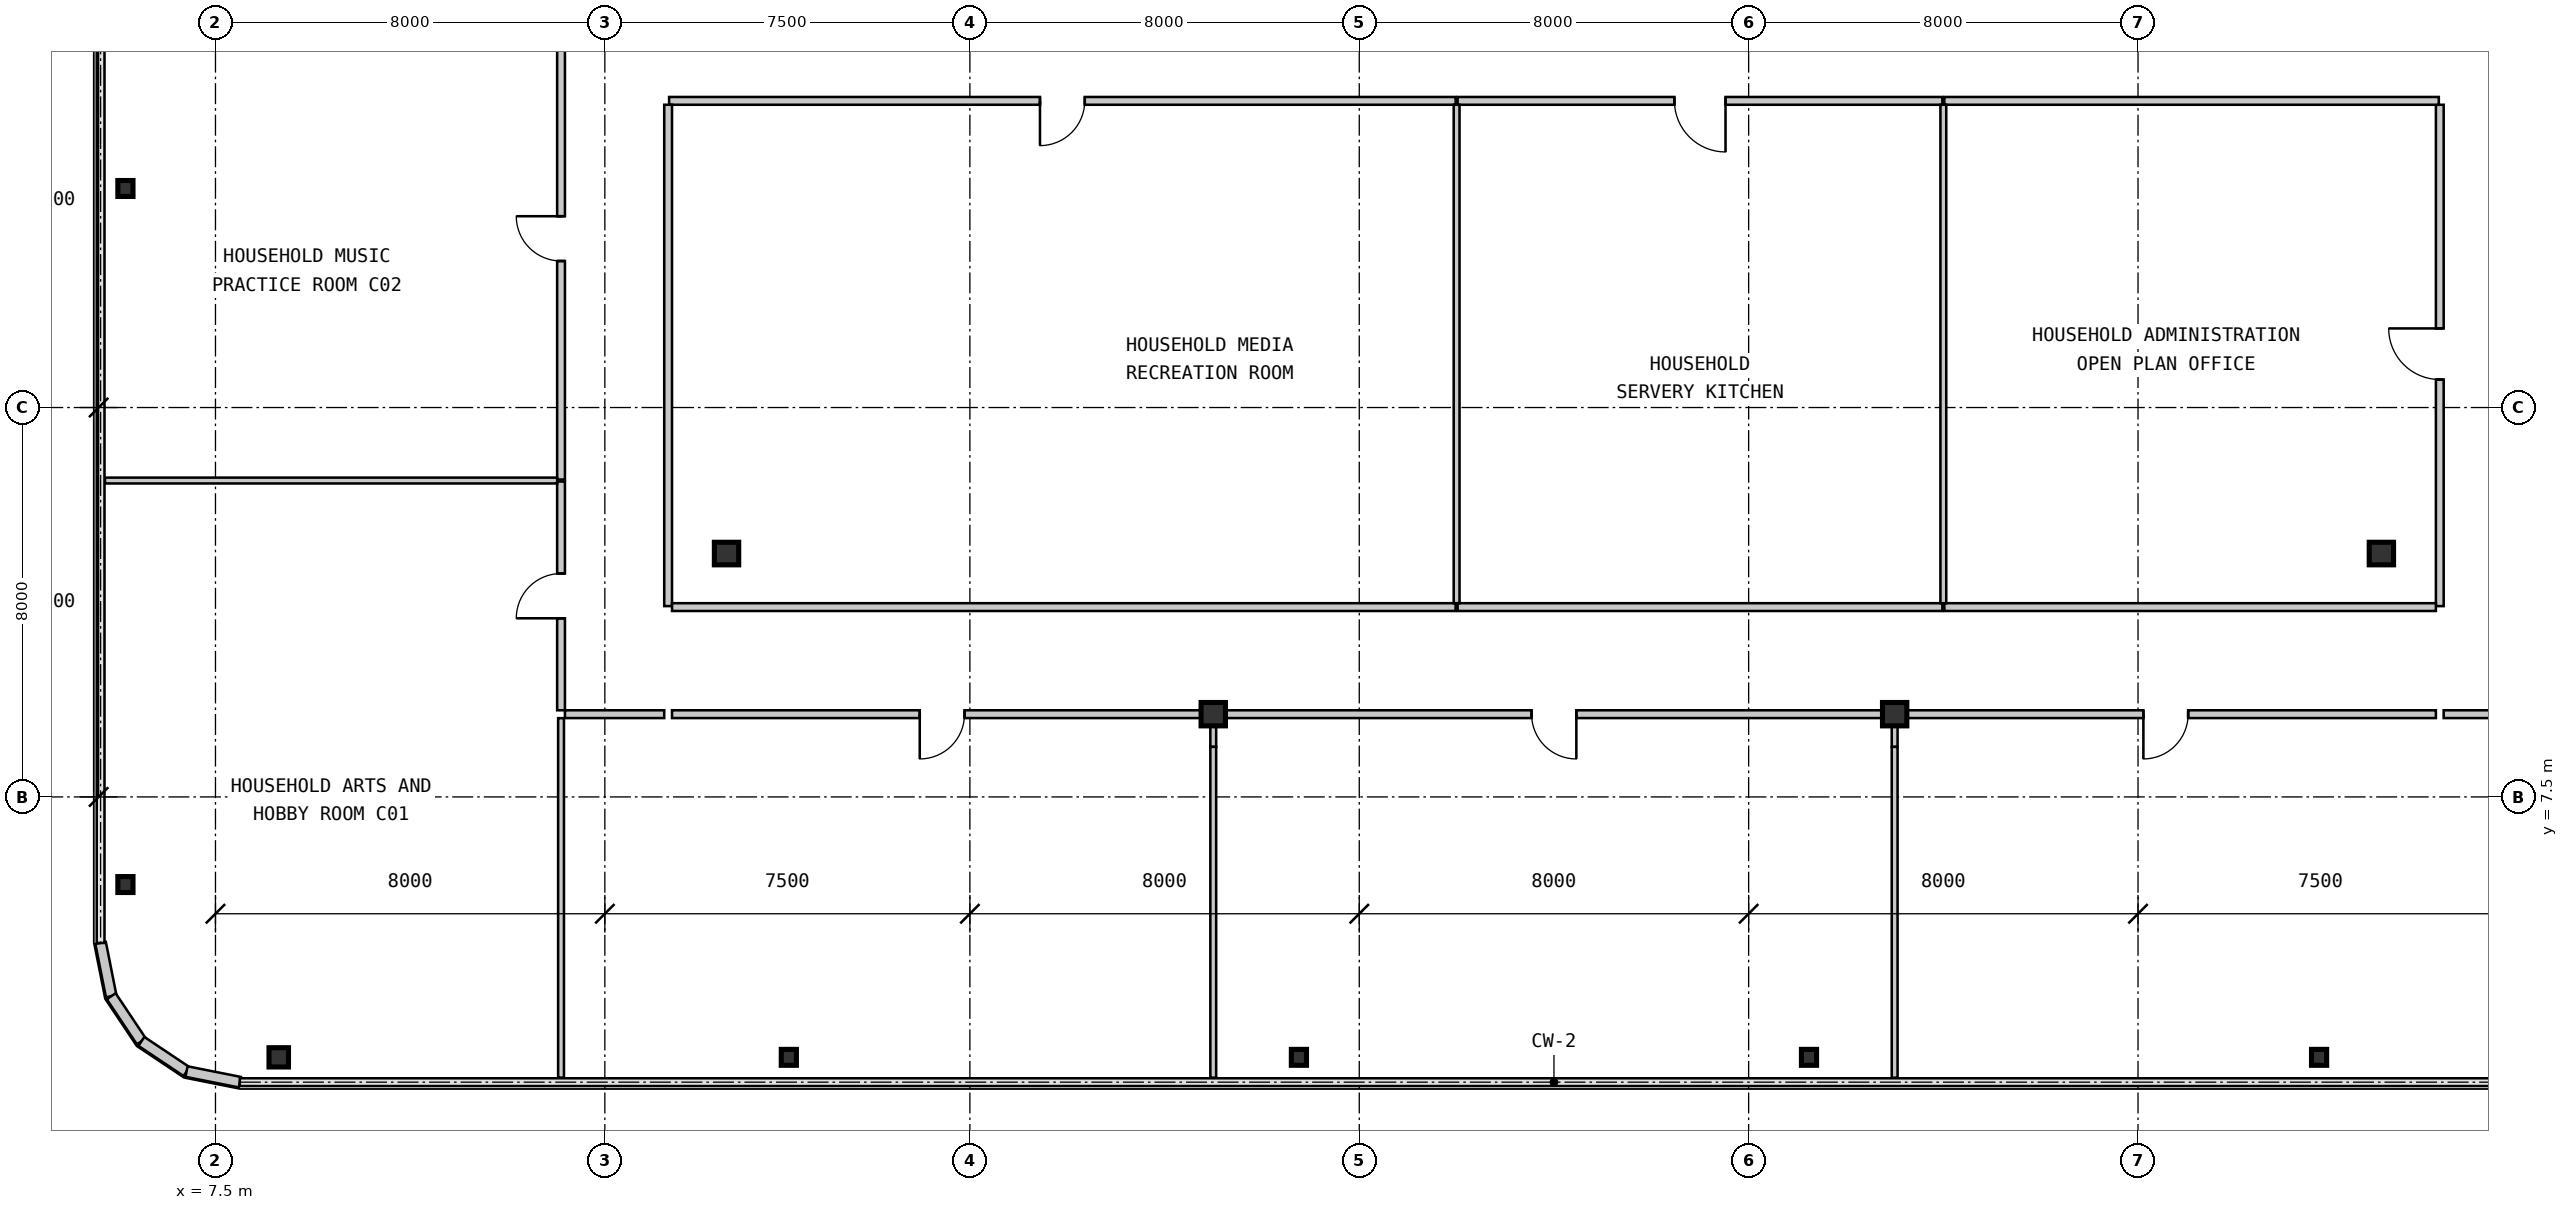
"""IFC4 building model, lengths in metres.
Left out: names, types, materials, properties, quantities, classifications, styles, units other than length and angle.
Written with IfcOpenShell. Run it as: python <this file> out.ifc"""

import sys

from ifc_helpers import new_model, si_unit, direction, frame, frame_2d, origin, origin_2d, place, context, subcontext, project, spatial, rectangle, i_section, extrude, source, transform, mapped, element, fill, save


model = new_model("IFC4")
c1 = context("Model", 3, precision=1e-05, world=origin(), true_north=direction((0.0, 1.0)))
c2 = subcontext(c1, "Body", "Model", "MODEL_VIEW")
j1 = project(units=[si_unit("LENGTHUNIT", "METRE"), si_unit("PLANEANGLEUNIT", "RADIAN")], contexts=[c1])
p1 = place(None, origin())
s1 = spatial("IfcSite", under=j1, at=p1, CompositionType="ELEMENT")
p2 = place(p1, origin())
s2 = spatial("IfcBuilding", under=s1, at=p2, CompositionType="ELEMENT")
p3 = place(p2, frame((0.0, 0.0, 38.85)))
s3 = spatial("IfcBuildingStorey", under=s2, at=p3, CompositionType="ELEMENT", Elevation=38.85)
m1 = source(origin(), c2, "Body", "SweptSolid", [
    extrude(i_section(OverallWidth=0.5, OverallDepth=0.48, WebThickness=0.028, FlangeThickness=0.044, at=origin_2d()), origin(), (0.0, 0.0, 1.0), 3.15),
])
for number, where, z_axis, x_axis in (
    (1, (28.0, 9.2, 0.0), (0.0, 0.0, 1.0), (1.0, 0.0, 0.0)),
    (2, (42.0, 9.2, 0.0), (0.0, 0.0, 1.0), (1.0, 0.0, 0.0)),
):
    element("IfcColumn", number, at=place(p3, frame(where, z_axis=z_axis, x_axis=x_axis)), inside=s3, PredefinedType="COLUMN", context=c2, shape_type="MappedRepresentation", body=[
        mapped(m1, transform((0.0, 0.0, 0.0), scale=1.0)),
    ])
m2 = source(origin(), c2, "Body", "SweptSolid", [
    extrude(i_section(OverallWidth=0.5, OverallDepth=0.464, WebThickness=0.022, FlangeThickness=0.034, at=origin_2d()), origin(), (0.0, 0.0, 1.0), 3.15),
])
for number, where, z_axis, x_axis in (
    (3, (18.0, 12.5, 0.0), (0.0, 0.0, 1.0), (1.0, 0.0, 0.0)),
    (4, (52.0, 12.5, 0.0), (0.0, 0.0, 1.0), (1.0, 0.0, 0.0)),
):
    element("IfcColumn", number, at=place(p3, frame(where, z_axis=z_axis, x_axis=x_axis)), inside=s3, PredefinedType="COLUMN", context=c2, shape_type="MappedRepresentation", body=[
        mapped(m2, transform((0.0, 0.0, 0.0), scale=1.0)),
    ])
m3 = source(origin(), c2, "Body", "SweptSolid", [
    extrude(i_section(OverallWidth=0.4, OverallDepth=0.396, WebThickness=0.022, FlangeThickness=0.034, at=origin_2d()), origin(), (0.0, 0.0, 1.0), 3.15),
])
p4 = place(p3, frame((8.8, 2.15, 0.0), z_axis=(0.0, 0.0, 1.0), x_axis=(1.0, 0.0, 0.0)))
e5 = element("IfcColumn", 5, at=p4, inside=s3, PredefinedType="COLUMN", context=c2, shape_type="MappedRepresentation", body=[
    mapped(m3, transform((0.0, 0.0, 0.0), scale=1.0)),
])
m4 = source(origin(), c2, "Body", "SweptSolid", [
    extrude(i_section(OverallWidth=0.311, OverallDepth=0.327, WebThickness=0.016, FlangeThickness=0.025, at=origin_2d()), origin(), (0.0, 0.0, 1.0), 3.15),
])
for number, where, z_axis, x_axis in (
    (6, (19.28, 2.15, 0.0), (0.0, 0.0, 1.0), (1.0, 0.0, 0.0)),
    (7, (29.76, 2.15, 0.0), (0.0, 0.0, 1.0), (1.0, 0.0, 0.0)),
    (8, (40.24, 2.15, 0.0), (0.0, 0.0, 1.0), (1.0, 0.0, 0.0)),
    (9, (50.72, 2.15, 0.0), (0.0, 0.0, 1.0), (1.0, 0.0, 0.0)),
    (10, (5.65, 5.7, 0.0), (0.0, 0.0, 1.0), (1.0, 0.0, 0.0)),
    (11, (5.65, 20.0, 0.0), (0.0, 0.0, 1.0), (1.0, 0.0, 0.0)),
):
    element("IfcColumn", number, at=place(p3, frame(where, z_axis=z_axis, x_axis=x_axis)), inside=s3, PredefinedType="COLUMN", context=c2, shape_type="MappedRepresentation", body=[
        mapped(m4, transform((0.0, 0.0, 0.0), scale=1.0)),
    ])
m5 = source(origin(), c2, "Body", "SweptSolid", [
    extrude(rectangle(XDim=1.116, YDim=0.22, at=frame_2d((0.558, 0.0))), origin(), (0.0, 0.0, 1.0), 2.93),
])
for number, where, z_axis, x_axis in (
    (12, (5.14, 4.5, 0.0), (0.0, 0.0, 1.0), (0.195, -0.981, 0.0)),
    (13, (5.358, 3.406, 0.0), (0.0, 0.0, 1.0), (0.556, -0.831, 0.0)),
    (14, (5.978, 2.478, 0.0), (0.0, 0.0, 1.0), (0.831, -0.556, 0.0)),
    (15, (6.906, 1.858, 0.0), (0.0, 0.0, 1.0), (0.981, -0.195, 0.0)),
):
    element("IfcWall", number, at=place(p3, frame(where, z_axis=z_axis, x_axis=x_axis)), inside=s3, PredefinedType="SOLIDWALL", context=c2, shape_type="MappedRepresentation", body=[
        mapped(m5, transform((0.0, 0.0, 0.0), scale=1.0)),
    ])
m6 = source(origin(), c2, "Body", "SweptSolid", [
    extrude(rectangle(XDim=16.159, YDim=0.16, at=frame_2d((8.08, 0.0))), origin(), (0.0, 0.0, 1.0), 2.93),
])
p5 = place(p3, frame((32.98, 21.8, 0.0), z_axis=(0.0, 0.0, 1.0), x_axis=(-1.0, 0.0, 0.0)))
e16 = element("IfcWall", 16, at=p5, inside=s3, PredefinedType="PARTITIONING", context=c2, shape_type="MappedRepresentation", body=[
    mapped(m6, transform((0.0, 0.0, 0.0), scale=1.0)),
])
m7 = source(origin(), c2, "Body", "SweptSolid", [
    extrude(rectangle(XDim=0.92, YDim=2.1, at=frame_2d((0.46, 1.05))), frame((0.0, 0.09, 0.0), z_axis=(0.0, -1.0, 0.0), x_axis=(1.0, 0.0, 0.0)), (0.0, 0.0, 1.0), 0.18),
])
p6 = place(p5, frame((7.62, 0.0, 0.0)))
e17 = element("IfcOpeningElement", 17, at=p6, cuts=e16, PredefinedType="OPENING", context=c2, shape_type="MappedRepresentation", body=[
    mapped(m7, transform((0.0, 0.0, 0.0), scale=1.0)),
])
m8 = source(origin(), c2, "Body", "SweptSolid", [
    extrude(rectangle(XDim=10.3, YDim=0.16, at=frame_2d((5.15, 0.0))), origin(), (0.0, 0.0, 1.0), 2.93),
])
p7 = place(p3, frame((16.8, 21.72, 0.0), z_axis=(0.0, 0.0, 1.0), x_axis=(0.0, -1.0, 0.0)))
e18 = element("IfcWall", 18, at=p7, inside=s3, PredefinedType="PARTITIONING", context=c2, shape_type="MappedRepresentation", body=[
    mapped(m8, transform((0.0, 0.0, 0.0), scale=1.0)),
])
m9 = source(origin(), c2, "Body", "SweptSolid", [
    extrude(rectangle(XDim=9.959, YDim=0.16, at=frame_2d((4.98, 0.0))), origin(), (0.0, 0.0, 1.0), 2.93),
])
p8 = place(p3, frame((42.98, 21.8, 0.0), z_axis=(0.0, 0.0, 1.0), x_axis=(-1.0, 0.0, 0.0)))
e19 = element("IfcWall", 19, at=p8, inside=s3, PredefinedType="PARTITIONING", context=c2, shape_type="MappedRepresentation", body=[
    mapped(m9, transform((0.0, 0.0, 0.0), scale=1.0)),
])
m10 = source(origin(), c2, "Body", "SweptSolid", [
    extrude(rectangle(XDim=1.05, YDim=2.1, at=frame_2d((0.525, 1.05))), frame((0.0, 0.09, 0.0), z_axis=(0.0, -1.0, 0.0), x_axis=(1.0, 0.0, 0.0)), (0.0, 0.0, 1.0), 0.18),
])
p9 = place(p8, frame((4.455, 0.0, 0.0)))
e20 = element("IfcOpeningElement", 20, at=p9, cuts=e19, PredefinedType="OPENING", context=c2, shape_type="MappedRepresentation", body=[
    mapped(m10, transform((0.0, 0.0, 0.0), scale=1.0)),
])
p10 = place(p3, frame((53.2, 11.42, 0.0), z_axis=(0.0, 0.0, 1.0), x_axis=(0.0, 1.0, 0.0)))
e21 = element("IfcWall", 21, at=p10, inside=s3, PredefinedType="PARTITIONING", context=c2, shape_type="MappedRepresentation", body=[
    mapped(m8, transform((0.0, 0.0, 0.0), scale=1.0)),
])
p11 = place(p10, frame((4.655, 0.0, 0.0)))
e22 = element("IfcOpeningElement", 22, at=p11, cuts=e21, PredefinedType="OPENING", context=c2, shape_type="MappedRepresentation", body=[
    mapped(m10, transform((0.0, 0.0, 0.0), scale=1.0)),
])
m11 = source(origin(), c2, "Body", "SweptSolid", [
    extrude(rectangle(XDim=10.159, YDim=0.16, at=frame_2d((5.08, 0.0))), origin(), (0.0, 0.0, 1.0), 2.93),
])
p12 = place(p3, frame((53.18, 21.8, 0.0), z_axis=(0.0, 0.0, 1.0), x_axis=(-1.0, 0.0, 0.0)))
e23 = element("IfcWall", 23, at=p12, inside=s3, PredefinedType="PARTITIONING", context=c2, shape_type="MappedRepresentation", body=[
    mapped(m11, transform((0.0, 0.0, 0.0), scale=1.0)),
])
m12 = source(origin(), c2, "Body", "SweptSolid", [
    extrude(rectangle(XDim=2.04, YDim=0.16, at=frame_2d((1.02, 0.0))), origin(), (0.0, 0.0, 1.0), 2.93),
])
for number, where, z_axis, x_axis in (
    (24, (16.72, 9.2, 0.0), (0.0, 0.0, 1.0), (-1.0, 0.0, 0.0)),
    (25, (55.32, 9.2, 0.0), (0.0, 0.0, 1.0), (-1.0, 0.0, 0.0)),
):
    element("IfcWall", number, at=place(p3, frame(where, z_axis=z_axis, x_axis=x_axis)), inside=s3, PredefinedType="PARTITIONING", context=c2, shape_type="MappedRepresentation", body=[
        mapped(m12, transform((0.0, 0.0, 0.0), scale=1.0)),
    ])
m13 = source(origin(), c2, "Body", "SweptSolid", [
    extrude(rectangle(XDim=4.7, YDim=0.16, at=frame_2d((2.35, 0.0))), origin(), (0.0, 0.0, 1.0), 2.93),
])
p13 = place(p3, frame((14.6, 9.28, 0.0), z_axis=(0.0, 0.0, 1.0), x_axis=(0.0, 1.0, 0.0)))
e26 = element("IfcWall", 26, at=p13, inside=s3, PredefinedType="PARTITIONING", context=c2, shape_type="MappedRepresentation", body=[
    mapped(m13, transform((0.0, 0.0, 0.0), scale=1.0)),
])
p14 = place(p13, frame((1.89, 0.0, 0.0)))
e27 = element("IfcOpeningElement", 27, at=p14, cuts=e26, PredefinedType="OPENING", context=c2, shape_type="MappedRepresentation", body=[
    mapped(m7, transform((0.0, 0.0, 0.0), scale=1.0)),
])
m14 = source(origin(), c2, "Body", "SweptSolid", [
    extrude(rectangle(XDim=9.9, YDim=0.16, at=frame_2d((4.95, 0.0))), origin(), (0.0, 0.0, 1.0), 2.93),
])
p15 = place(p3, frame((14.6, 14.02, 0.0), z_axis=(0.0, 0.0, 1.0), x_axis=(0.0, 1.0, 0.0)))
e28 = element("IfcWall", 28, at=p15, inside=s3, PredefinedType="PARTITIONING", context=c2, shape_type="MappedRepresentation", body=[
    mapped(m14, transform((0.0, 0.0, 0.0), scale=1.0)),
])
p16 = place(p15, frame((4.49, 0.0, 0.0)))
e29 = element("IfcOpeningElement", 29, at=p16, cuts=e28, PredefinedType="OPENING", context=c2, shape_type="MappedRepresentation", body=[
    mapped(m7, transform((0.0, 0.0, 0.0), scale=1.0)),
])
m15 = source(origin(), c2, "Body", "SweptSolid", [
    extrude(rectangle(XDim=16.1, YDim=0.16, at=frame_2d((8.05, 0.0))), origin(), (0.0, 0.0, 1.0), 2.93),
])
p17 = place(p3, frame((16.88, 11.4, 0.0), z_axis=(0.0, 0.0, 1.0), x_axis=(1.0, 0.0, 0.0)))
e30 = element("IfcWall", 30, at=p17, inside=s3, PredefinedType="PARTITIONING", context=c2, shape_type="MappedRepresentation", body=[
    mapped(m15, transform((0.0, 0.0, 0.0), scale=1.0)),
])
p18 = place(p3, frame((33.02, 11.4, 0.0), z_axis=(0.0, 0.0, 1.0), x_axis=(1.0, 0.0, 0.0)))
e31 = element("IfcWall", 31, at=p18, inside=s3, PredefinedType="PARTITIONING", context=c2, shape_type="MappedRepresentation", body=[
    mapped(m9, transform((0.0, 0.0, 0.0), scale=1.0)),
])
m16 = source(origin(), c2, "Body", "SweptSolid", [
    extrude(rectangle(XDim=10.1, YDim=0.16, at=frame_2d((5.05, 0.0))), origin(), (0.0, 0.0, 1.0), 2.93),
])
p19 = place(p3, frame((43.02, 11.4, 0.0), z_axis=(0.0, 0.0, 1.0), x_axis=(1.0, 0.0, 0.0)))
e32 = element("IfcWall", 32, at=p19, inside=s3, PredefinedType="PARTITIONING", context=c2, shape_type="MappedRepresentation", body=[
    mapped(m16, transform((0.0, 0.0, 0.0), scale=1.0)),
])
m17 = source(origin(), c2, "Body", "SweptSolid", [
    extrude(rectangle(XDim=11.1, YDim=0.16, at=frame_2d((5.55, 0.0))), origin(), (0.0, 0.0, 1.0), 2.93),
])
p20 = place(p3, frame((27.98, 9.2, 0.0), z_axis=(0.0, 0.0, 1.0), x_axis=(-1.0, 0.0, 0.0)))
e33 = element("IfcWall", 33, at=p20, inside=s3, PredefinedType="PARTITIONING", context=c2, shape_type="MappedRepresentation", body=[
    mapped(m17, transform((0.0, 0.0, 0.0), scale=1.0)),
])
p21 = place(p20, frame((5.09, 0.0, 0.0)))
e34 = element("IfcOpeningElement", 34, at=p21, cuts=e33, PredefinedType="OPENING", context=c2, shape_type="MappedRepresentation", body=[
    mapped(m7, transform((0.0, 0.0, 0.0), scale=1.0)),
])
m18 = source(origin(), c2, "Body", "SweptSolid", [
    extrude(rectangle(XDim=13.959, YDim=0.16, at=frame_2d((6.98, 0.0))), origin(), (0.0, 0.0, 1.0), 2.328),
])
p22 = place(p3, frame((41.98, 9.2, 0.0), z_axis=(0.0, 0.0, 1.0), x_axis=(-1.0, 0.0, 0.0)))
e35 = element("IfcWall", 35, at=p22, inside=s3, PredefinedType="PARTITIONING", context=c2, shape_type="MappedRepresentation", body=[
    mapped(m18, transform((0.0, 0.0, 0.0), scale=1.0)),
])
p23 = place(p22, frame((6.52, 0.0, 0.0)))
e36 = element("IfcOpeningElement", 36, at=p23, cuts=e35, PredefinedType="OPENING", context=c2, shape_type="MappedRepresentation", body=[
    mapped(m7, transform((0.0, 0.0, 0.0), scale=1.0)),
])
p24 = place(p3, frame((53.12, 9.2, 0.0), z_axis=(0.0, 0.0, 1.0), x_axis=(-1.0, 0.0, 0.0)))
e37 = element("IfcWall", 37, at=p24, inside=s3, PredefinedType="PARTITIONING", context=c2, shape_type="MappedRepresentation", body=[
    mapped(m17, transform((0.0, 0.0, 0.0), scale=1.0)),
])
p25 = place(p24, frame((5.09, 0.0, 0.0)))
e38 = element("IfcOpeningElement", 38, at=p25, cuts=e37, PredefinedType="OPENING", context=c2, shape_type="MappedRepresentation", body=[
    mapped(m7, transform((0.0, 0.0, 0.0), scale=1.0)),
])
m19 = source(origin(), c2, "Body", "SweptSolid", [
    extrude(rectangle(XDim=10.24, YDim=0.12, at=frame_2d((5.12, 0.0))), origin(), (0.0, 0.0, 1.0), 2.93),
])
for number, where, z_axis, x_axis in (
    (39, (33.0, 21.72, 0.0), (0.0, 0.0, 1.0), (0.0, -1.0, 0.0)),
    (40, (43.0, 21.72, 0.0), (0.0, 0.0, 1.0), (0.0, -1.0, 0.0)),
):
    element("IfcWall", number, at=place(p3, frame(where, z_axis=z_axis, x_axis=x_axis)), inside=s3, PredefinedType="PARTITIONING", context=c2, shape_type="MappedRepresentation", body=[
        mapped(m19, transform((0.0, 0.0, 0.0), scale=1.0)),
    ])
m20 = source(origin(), c2, "Body", "SweptSolid", [
    extrude(rectangle(XDim=0.59, YDim=0.12, at=frame_2d((0.295, 0.0))), origin(), (0.0, 0.0, 1.0), 2.397),
])
p26 = place(p3, frame((28.0, 9.118, 0.0), z_axis=(0.0, 0.0, 1.0), x_axis=(0.0, -1.0, 0.0)))
e41 = element("IfcWall", 41, at=p26, inside=s3, PredefinedType="PARTITIONING", context=c2, shape_type="MappedRepresentation", body=[
    mapped(m20, transform((0.0, 0.0, 0.0), scale=1.0)),
])
m21 = source(origin(), c2, "Body", "SweptSolid", [
    extrude(rectangle(XDim=6.796, YDim=0.12, at=frame_2d((3.398, 0.0))), origin(), (0.0, 0.0, 1.0), 2.93),
])
p27 = place(p3, frame((28.0, 8.528, 0.0), z_axis=(0.0, 0.0, 1.0), x_axis=(0.0, -1.0, 0.0)))
e42 = element("IfcWall", 42, at=p27, inside=s3, PredefinedType="PARTITIONING", context=c2, shape_type="MappedRepresentation", body=[
    mapped(m21, transform((0.0, 0.0, 0.0), scale=1.0)),
])
m22 = source(origin(), c2, "Body", "SweptSolid", [
    extrude(rectangle(XDim=7.386, YDim=0.12, at=frame_2d((3.693, 0.0))), origin(), (0.0, 0.0, 1.0), 2.93),
])
p28 = place(p3, frame((14.6, 1.732, 0.0), z_axis=(0.0, 0.0, 1.0), x_axis=(0.0, 1.0, 0.0)))
e43 = element("IfcWall", 43, at=p28, inside=s3, PredefinedType="PARTITIONING", context=c2, shape_type="MappedRepresentation", body=[
    mapped(m22, transform((0.0, 0.0, 0.0), scale=1.0)),
])
p29 = place(p3, frame((42.0, 9.118, 0.0), z_axis=(0.0, 0.0, 1.0), x_axis=(0.0, -1.0, 0.0)))
e44 = element("IfcWall", 44, at=p29, inside=s3, PredefinedType="PARTITIONING", context=c2, shape_type="MappedRepresentation", body=[
    mapped(m20, transform((0.0, 0.0, 0.0), scale=1.0)),
])
p30 = place(p3, frame((42.0, 8.528, 0.0), z_axis=(0.0, 0.0, 1.0), x_axis=(0.0, -1.0, 0.0)))
e45 = element("IfcWall", 45, at=p30, inside=s3, PredefinedType="PARTITIONING", context=c2, shape_type="MappedRepresentation", body=[
    mapped(m21, transform((0.0, 0.0, 0.0), scale=1.0)),
])
m23 = source(origin(), c2, "Body", "SweptSolid", [
    extrude(rectangle(XDim=9.29, YDim=0.12, at=frame_2d((4.645, 0.0))), origin(), (0.0, 0.0, 1.0), 2.93),
])
p31 = place(p3, frame((5.23, 14.0, 0.0), z_axis=(0.0, 0.0, 1.0), x_axis=(1.0, 0.0, 0.0)))
e46 = element("IfcWall", 46, at=p31, inside=s3, PredefinedType="PARTITIONING", context=c2, shape_type="MappedRepresentation", body=[
    mapped(m23, transform((0.0, 0.0, 0.0), scale=1.0)),
])
m24 = source(origin(), c2, "Body", "SweptSolid", [
    extrude(rectangle(XDim=0.92, YDim=2.1, at=frame_2d((0.46, 1.05))), frame((0.0, 0.025, 0.0), z_axis=(0.0, -1.0, 0.0), x_axis=(1.0, 0.0, 0.0)), (0.0, 0.0, 1.0), 0.05),
])
p32 = place(p6, origin())
e47 = element("IfcDoor", 47, at=p32, inside=s3, OperationType="SINGLE_SWING_RIGHT", PredefinedType="DOOR", context=c2, shape_type="MappedRepresentation", body=[
    mapped(m24, transform((0.0, 0.0, 0.0), scale=1.0)),
])
fill(e17, e47)
m25 = source(origin(), c2, "Body", "SweptSolid", [
    extrude(rectangle(XDim=1.05, YDim=2.1, at=frame_2d((0.525, 1.05))), frame((0.0, 0.025, 0.0), z_axis=(0.0, -1.0, 0.0), x_axis=(1.0, 0.0, 0.0)), (0.0, 0.0, 1.0), 0.05),
])
p33 = place(p9, origin())
e48 = element("IfcDoor", 48, at=p33, inside=s3, OperationType="SINGLE_SWING_LEFT", PredefinedType="DOOR", context=c2, shape_type="MappedRepresentation", body=[
    mapped(m25, transform((0.0, 0.0, 0.0), scale=1.0)),
])
fill(e20, e48)
p34 = place(p11, origin())
e49 = element("IfcDoor", 49, at=p34, inside=s3, OperationType="SINGLE_SWING_RIGHT", PredefinedType="DOOR", context=c2, shape_type="MappedRepresentation", body=[
    mapped(m25, transform((0.0, 0.0, 0.0), scale=1.0)),
])
fill(e22, e49)
p35 = place(p14, origin())
e50 = element("IfcDoor", 50, at=p35, inside=s3, OperationType="SINGLE_SWING_LEFT", PredefinedType="DOOR", context=c2, shape_type="MappedRepresentation", body=[
    mapped(m24, transform((0.0, 0.0, 0.0), scale=1.0)),
])
fill(e27, e50)
p36 = place(p16, origin())
e51 = element("IfcDoor", 51, at=p36, inside=s3, OperationType="SINGLE_SWING_RIGHT", PredefinedType="DOOR", context=c2, shape_type="MappedRepresentation", body=[
    mapped(m24, transform((0.0, 0.0, 0.0), scale=1.0)),
])
fill(e29, e51)
p37 = place(p21, origin())
e52 = element("IfcDoor", 52, at=p37, inside=s3, OperationType="SINGLE_SWING_RIGHT", PredefinedType="DOOR", context=c2, shape_type="MappedRepresentation", body=[
    mapped(m24, transform((0.0, 0.0, 0.0), scale=1.0)),
])
fill(e34, e52)
p38 = place(p23, origin())
e53 = element("IfcDoor", 53, at=p38, inside=s3, OperationType="SINGLE_SWING_LEFT", PredefinedType="DOOR", context=c2, shape_type="MappedRepresentation", body=[
    mapped(m24, transform((0.0, 0.0, 0.0), scale=1.0)),
])
fill(e36, e53)
p39 = place(p25, origin())
e54 = element("IfcDoor", 54, at=p39, inside=s3, OperationType="SINGLE_SWING_RIGHT", PredefinedType="DOOR", context=c2, shape_type="MappedRepresentation", body=[
    mapped(m24, transform((0.0, 0.0, 0.0), scale=1.0)),
])
fill(e38, e54)
save(model, sys.argv[1])
